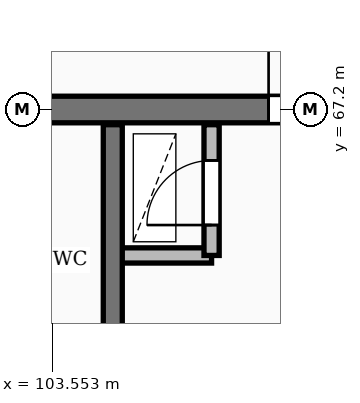
"""IFC4 building model, lengths in metres.
Left out: names, types, materials, properties, quantities, classifications, styles, units other than length and angle.
Written with IfcOpenShell. Run it as: python <this file> out.ifc"""

import sys

from ifc_helpers import new_model, si_unit, direction, frame, frame_2d, origin, place, context, subcontext, project, spatial, rectangle, extrude, element, fill, save


model = new_model("IFC4")
c1 = context("Model", 3, precision=1e-05, world=origin(), true_north=direction((0.0, 1.0)))
c2 = subcontext(c1, "Body", "Model", "MODEL_VIEW")
j1 = project(units=[si_unit("LENGTHUNIT", "METRE"), si_unit("PLANEANGLEUNIT", "RADIAN")], contexts=[c1])
p1 = place(None, origin())
s1 = spatial("IfcSite", under=j1, at=p1, CompositionType="ELEMENT")
p2 = place(p1, origin())
s2 = spatial("IfcBuilding", under=s1, at=p2, CompositionType="ELEMENT")
p3 = place(p2, frame((0.0, 0.0, 24.0)))
s3 = spatial("IfcBuildingStorey", under=s2, at=p3, CompositionType="ELEMENT", Elevation=24.0)
p4 = place(p3, frame((75.95, 67.2, 0.0), z_axis=(0.0, 0.0, 1.0), x_axis=(1.0, 0.0, 0.0)))
e1 = element("IfcWall", 1, at=p4, inside=s3, PredefinedType="SHEAR", context=c2, shape_type="SweptSolid", body=[
    extrude(rectangle(XDim=36.3, YDim=0.35, at=frame_2d((18.15, 0.0))), origin(), (0.0, 0.0, 1.0), 3.25),
])
p5 = place(p4, frame((5.25, 0.0, 0.0)))
e2 = element("IfcOpeningElement", 2, at=p5, cuts=e1, PredefinedType="OPENING", context=c2, shape_type="SweptSolid", body=[
    extrude(rectangle(XDim=1.0, YDim=2.15, at=frame_2d((0.5, 1.075))), frame((0.0, 0.185, 0.0), z_axis=(0.0, -1.0, 0.0), x_axis=(1.0, 0.0, 0.0)), (0.0, 0.0, 1.0), 0.37),
])
p6 = place(p4, frame((21.6, 0.0, 0.0)))
e3 = element("IfcOpeningElement", 3, at=p6, cuts=e1, PredefinedType="OPENING", context=c2, shape_type="SweptSolid", body=[
    extrude(rectangle(XDim=1.5, YDim=2.2, at=frame_2d((0.75, 1.1))), frame((0.0, 0.185, 0.0), z_axis=(0.0, -1.0, 0.0), x_axis=(1.0, 0.0, 0.0)), (0.0, 0.0, 1.0), 0.37),
])
p7 = place(p4, frame((30.45, 0.0, 0.0)))
e4 = element("IfcOpeningElement", 4, at=p7, cuts=e1, PredefinedType="OPENING", context=c2, shape_type="SweptSolid", body=[
    extrude(rectangle(XDim=1.0, YDim=2.15, at=frame_2d((0.5, 1.075))), frame((0.0, 0.185, 0.0), z_axis=(0.0, -1.0, 0.0), x_axis=(1.0, 0.0, 0.0)), (0.0, 0.0, 1.0), 0.37),
])
p8 = place(p3, frame((104.45, 65.28, 0.0), z_axis=(0.0, 0.0, 1.0), x_axis=(1.0, 0.0, 0.0)))
e5 = element("IfcWall", 5, at=p8, inside=s3, PredefinedType="PARTITIONING", context=c2, shape_type="SweptSolid", body=[
    extrude(rectangle(XDim=1.2, YDim=0.2, at=frame_2d((0.6, 0.0))), origin(), (0.0, 0.0, 1.0), 2.97),
])
p9 = place(p3, frame((105.65, 65.28, 0.0), z_axis=(0.0, 0.0, 1.0), x_axis=(0.0, 1.0, 0.0)))
e6 = element("IfcWall", 6, at=p9, inside=s3, PredefinedType="PARTITIONING", context=c2, shape_type="SweptSolid", body=[
    extrude(rectangle(XDim=1.72, YDim=0.2, at=frame_2d((0.86, 0.0))), origin(), (0.0, 0.0, 1.0), 2.97),
])
p10 = place(p9, frame((0.4, 0.0, 0.0)))
e7 = element("IfcOpeningElement", 7, at=p10, cuts=e6, PredefinedType="OPENING", context=c2, shape_type="SweptSolid", body=[
    extrude(rectangle(XDim=0.85, YDim=2.05, at=frame_2d((0.425, 1.025))), frame((0.0, 0.11, 0.0), z_axis=(0.0, -1.0, 0.0), x_axis=(1.0, 0.0, 0.0)), (0.0, 0.0, 1.0), 0.22),
])
p11 = place(p3, frame((104.35, 58.4, 0.0), z_axis=(0.0, 0.0, 1.0), x_axis=(0.0, 1.0, 0.0)))
e8 = element("IfcWall", 8, at=p11, inside=s3, PredefinedType="SHEAR", context=c2, shape_type="SweptSolid", body=[
    extrude(rectangle(XDim=8.6, YDim=0.25, at=frame_2d((4.3, 0.0))), origin(), (0.0, 0.0, 1.0), 3.25),
])
p12 = place(p11, frame((1.8, 0.0, 0.0)))
e9 = element("IfcOpeningElement", 9, at=p12, cuts=e8, PredefinedType="OPENING", context=c2, shape_type="SweptSolid", body=[
    extrude(rectangle(XDim=1.1, YDim=2.1, at=frame_2d((0.55, 1.05))), frame((0.0, 0.135, 0.0), z_axis=(0.0, -1.0, 0.0), x_axis=(1.0, 0.0, 0.0)), (0.0, 0.0, 1.0), 0.27),
])
p13 = place(p7, origin())
e10 = element("IfcDoor", 10, at=p13, inside=s3, OperationType="SINGLE_SWING_LEFT", PredefinedType="DOOR", context=c2, shape_type="SweptSolid", body=[
    extrude(rectangle(XDim=1.0, YDim=2.15, at=frame_2d((0.5, 1.075))), frame((0.0, 0.025, 0.0), z_axis=(0.0, -1.0, 0.0), x_axis=(1.0, 0.0, 0.0)), (0.0, 0.0, 1.0), 0.05),
])
fill(e4, e10)
p14 = place(p10, origin())
e11 = element("IfcDoor", 11, at=p14, inside=s3, OperationType="SINGLE_SWING_LEFT", PredefinedType="DOOR", context=c2, shape_type="SweptSolid", body=[
    extrude(rectangle(XDim=0.85, YDim=2.05, at=frame_2d((0.425, 1.025))), frame((0.0, 0.025, 0.0), z_axis=(0.0, -1.0, 0.0), x_axis=(1.0, 0.0, 0.0)), (0.0, 0.0, 1.0), 0.05),
])
fill(e7, e11)
save(model, sys.argv[1])
